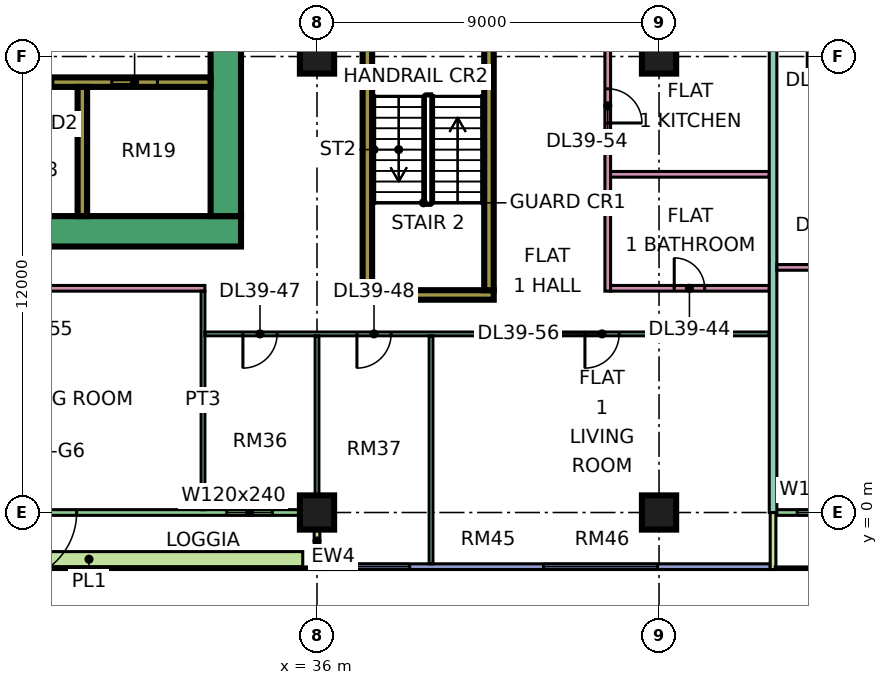
"""IFC4 building model, lengths in metres.
Left out: names, types, materials, properties, quantities, classifications, styles, units other than length and angle.
Written with IfcOpenShell. Run it as: python <this file> out.ifc"""

import sys

from ifc_helpers import new_model, si_unit, direction, frame, frame_2d, origin, origin_2d, place, context, subcontext, project, spatial, rectangle, extrude, element, fill, save


model = new_model("IFC4")
c1 = context("Model", 3, precision=1e-05, world=origin(), true_north=direction((0.0, 1.0)))
c2 = subcontext(c1, "Body", "Model", "MODEL_VIEW")
j1 = project(units=[si_unit("LENGTHUNIT", "METRE"), si_unit("PLANEANGLEUNIT", "RADIAN")], contexts=[c1])
p1 = place(None, origin())
s1 = spatial("IfcSite", under=j1, at=p1, CompositionType="ELEMENT")
p2 = place(p1, origin())
s2 = spatial("IfcBuilding", under=s1, at=p2, CompositionType="ELEMENT")
p3 = place(p2, frame((0.0, 0.0, 172.4)))
s3 = spatial("IfcBuildingStorey", under=s2, at=p3, CompositionType="ELEMENT", Elevation=172.4)
for number, where, z_axis, x_axis in (
    (1, (36.0, 0.0, 0.0), (0.0, 0.0, 1.0), (1.0, 0.0, 0.0)),
    (2, (36.0, 12.0, 0.0), (0.0, 0.0, 1.0), (1.0, 0.0, 0.0)),
    (3, (45.0, 0.0, 0.0), (0.0, 0.0, 1.0), (1.0, 0.0, 0.0)),
    (4, (45.0, 12.0, 0.0), (0.0, 0.0, 1.0), (1.0, 0.0, 0.0)),
):
    element("IfcColumn", number, at=place(p3, frame(where, z_axis=z_axis, x_axis=x_axis)), inside=s3, PredefinedType="COLUMN", context=c2, shape_type="SweptSolid", body=[
        extrude(rectangle(XDim=0.9, YDim=0.9, at=origin_2d()), origin(), (0.0, 0.0, 1.0), 3.75),
    ])
p4 = place(p3, frame((9.0, 7.4, 0.0), z_axis=(0.0, 0.0, 1.0), x_axis=(1.0, 0.0, 0.0)))
e5 = element("IfcWall", 5, at=p4, inside=s3, PredefinedType="SHEAR", context=c2, shape_type="SweptSolid", body=[
    extrude(rectangle(XDim=25.0, YDim=0.8, at=frame_2d((12.5, 0.0))), origin(), (0.0, 0.0, 1.0), 3.75),
])
p5 = place(p3, frame((33.6, 7.8, 0.0), z_axis=(0.0, 0.0, 1.0), x_axis=(0.0, 1.0, 0.0)))
e6 = element("IfcWall", 6, at=p5, inside=s3, PredefinedType="SHEAR", context=c2, shape_type="SweptSolid", body=[
    extrude(rectangle(XDim=11.4, YDim=0.8, at=frame_2d((5.7, 0.0))), origin(), (0.0, 0.0, 1.0), 3.75),
])
p6 = place(p5, frame((5.4, 0.0, 0.0)))
e7 = element("IfcOpeningElement", 7, at=p6, cuts=e6, PredefinedType="OPENING", context=c2, shape_type="SweptSolid", body=[
    extrude(rectangle(XDim=1.8, YDim=2.4, at=frame_2d((0.9, 1.2))), frame((0.0, 0.41, 0.0), z_axis=(0.0, -1.0, 0.0), x_axis=(1.0, 0.0, 0.0)), (0.0, 0.0, 1.0), 0.82),
])
p7 = place(p3, frame((13.45, 11.325, 0.0), z_axis=(0.0, 0.0, 1.0), x_axis=(1.0, 0.0, 0.0)))
e8 = element("IfcWall", 8, at=p7, inside=s3, PredefinedType="SHEAR", context=c2, shape_type="SweptSolid", body=[
    extrude(rectangle(XDim=19.75, YDim=0.25, at=frame_2d((9.875, 0.0))), origin(), (0.0, 0.0, 1.0), 3.75),
])
p8 = place(p7, frame((11.65, 0.0, 0.0)))
e9 = element("IfcOpeningElement", 9, at=p8, cuts=e8, PredefinedType="OPENING", context=c2, shape_type="SweptSolid", body=[
    extrude(rectangle(XDim=1.2, YDim=2.2, at=frame_2d((0.6, 1.1))), frame((0.0, 0.135, 0.0), z_axis=(0.0, -1.0, 0.0), x_axis=(1.0, 0.0, 0.0)), (0.0, 0.0, 1.0), 0.27),
])
p9 = place(p7, frame((14.4, 0.0, 0.0)))
e10 = element("IfcOpeningElement", 10, at=p9, cuts=e8, PredefinedType="OPENING", context=c2, shape_type="SweptSolid", body=[
    extrude(rectangle(XDim=1.2, YDim=2.2, at=frame_2d((0.6, 1.1))), frame((0.0, 0.135, 0.0), z_axis=(0.0, -1.0, 0.0), x_axis=(1.0, 0.0, 0.0)), (0.0, 0.0, 1.0), 0.27),
])
p10 = place(p7, frame((17.15, 0.0, 0.0)))
e11 = element("IfcOpeningElement", 11, at=p10, cuts=e8, PredefinedType="OPENING", context=c2, shape_type="SweptSolid", body=[
    extrude(rectangle(XDim=1.2, YDim=2.2, at=frame_2d((0.6, 1.1))), frame((0.0, 0.135, 0.0), z_axis=(0.0, -1.0, 0.0), x_axis=(1.0, 0.0, 0.0)), (0.0, 0.0, 1.0), 0.27),
])
p11 = place(p7, frame((2.8, 0.0, 0.0)))
e12 = element("IfcOpeningElement", 12, at=p11, cuts=e8, PredefinedType="OPENING", context=c2, shape_type="SweptSolid", body=[
    extrude(rectangle(XDim=0.9, YDim=2.1, at=frame_2d((0.45, 1.05))), frame((0.0, 0.135, 0.0), z_axis=(0.0, -1.0, 0.0), x_axis=(1.0, 0.0, 0.0)), (0.0, 0.0, 1.0), 0.27),
])
p12 = place(p7, frame((8.175, 0.0, 0.0)))
e13 = element("IfcOpeningElement", 13, at=p12, cuts=e8, PredefinedType="OPENING", context=c2, shape_type="SweptSolid", body=[
    extrude(rectangle(XDim=0.9, YDim=2.1, at=frame_2d((0.45, 1.05))), frame((0.0, 0.135, 0.0), z_axis=(0.0, -1.0, 0.0), x_axis=(1.0, 0.0, 0.0)), (0.0, 0.0, 1.0), 0.27),
])
p13 = place(p3, frame((29.825, 7.8, 0.0), z_axis=(0.0, 0.0, 1.0), x_axis=(0.0, 1.0, 0.0)))
e14 = element("IfcWall", 14, at=p13, inside=s3, PredefinedType="SHEAR", context=c2, shape_type="SweptSolid", body=[
    extrude(rectangle(XDim=3.4, YDim=0.25, at=frame_2d((1.7, 0.0))), origin(), (0.0, 0.0, 1.0), 3.75),
])
p14 = place(p3, frame((37.2, 5.725, 0.0), z_axis=(0.0, 0.0, 1.0), x_axis=(1.0, 0.0, 0.0)))
e15 = element("IfcWall", 15, at=p14, inside=s3, PredefinedType="SHEAR", context=c2, shape_type="SweptSolid", body=[
    extrude(rectangle(XDim=3.45, YDim=0.25, at=frame_2d((1.725, 0.0))), origin(), (0.0, 0.0, 1.0), 3.75),
])
for number, where, z_axis, x_axis in (
    (16, (37.325, 5.85, 0.0), (0.0, 0.0, 1.0), (0.0, 1.0, 0.0)),
    (17, (40.525, 5.85, 0.0), (0.0, 0.0, 1.0), (0.0, 1.0, 0.0)),
):
    element("IfcWall", number, at=place(p3, frame(where, z_axis=z_axis, x_axis=x_axis)), inside=s3, PredefinedType="SHEAR", context=c2, shape_type="SweptSolid", body=[
        extrude(rectangle(XDim=6.5, YDim=0.25, at=frame_2d((3.25, 0.0))), origin(), (0.0, 0.0, 1.0), 3.75),
    ])
p15 = place(p3, frame((24.075, 0.0, 0.0), z_axis=(0.0, 0.0, 1.0), x_axis=(1.0, 0.0, 0.0)))
e18 = element("IfcWall", 18, at=p15, inside=s3, PredefinedType="SOLIDWALL", context=c2, shape_type="SweptSolid", body=[
    extrude(rectangle(XDim=11.85, YDim=0.15, at=frame_2d((5.925, 0.0))), origin(), (0.0, 0.0, 1.0), 3.35),
])
p16 = place(p15, frame((3.8, 0.0, 0.0)))
e19 = element("IfcOpeningElement", 19, at=p16, cuts=e18, PredefinedType="OPENING", context=c2, shape_type="SweptSolid", body=[
    extrude(rectangle(XDim=1.8, YDim=2.4, at=frame_2d((0.9, 1.2))), frame((0.0, 0.085, 0.0), z_axis=(0.0, -1.0, 0.0), x_axis=(1.0, 0.0, 0.0)), (0.0, 0.0, 1.0), 0.17),
])
p17 = place(p15, frame((9.55, 0.0, 0.45)))
e20 = element("IfcOpeningElement", 20, at=p17, cuts=e18, PredefinedType="OPENING", context=c2, shape_type="SweptSolid", body=[
    extrude(rectangle(XDim=1.2, YDim=2.4, at=frame_2d((0.6, 1.2))), frame((0.0, 0.085, 0.0), z_axis=(0.0, -1.0, 0.0), x_axis=(1.0, 0.0, 0.0)), (0.0, 0.0, 1.0), 0.17),
])
p18 = place(p3, frame((36.0, -1.5, 0.0), z_axis=(0.0, 0.0, 1.0), x_axis=(0.0, 1.0, 0.0)))
e21 = element("IfcWall", 21, at=p18, inside=s3, PredefinedType="SOLIDWALL", context=c2, shape_type="SweptSolid", body=[
    extrude(rectangle(XDim=1.5, YDim=0.15, at=frame_2d((0.75, 0.0))), origin(), (0.0, 0.0, 1.0), 3.35),
])
p19 = place(p3, frame((36.075, -1.425, 0.0), z_axis=(0.0, 0.0, 1.0), x_axis=(1.0, 0.0, 0.0)))
e22 = element("IfcWall", 22, at=p19, inside=s3, PredefinedType="SOLIDWALL", context=c2, shape_type="SweptSolid", body=[
    extrude(rectangle(XDim=11.85, YDim=0.15, at=frame_2d((5.925, 0.0))), origin(), (0.0, 0.0, 1.0), 3.35),
])
p20 = place(p19, frame((0.562, 0.0, 0.45)))
e23 = element("IfcOpeningElement", 23, at=p20, cuts=e22, PredefinedType="OPENING", context=c2, shape_type="SweptSolid", body=[
    extrude(rectangle(XDim=1.8, YDim=2.4, at=frame_2d((0.9, 1.2))), frame((0.0, 0.085, 0.0), z_axis=(0.0, -1.0, 0.0), x_axis=(1.0, 0.0, 0.0)), (0.0, 0.0, 1.0), 0.17),
])
p21 = place(p19, frame((5.887, 0.0, 0.45)))
e24 = element("IfcOpeningElement", 24, at=p21, cuts=e22, PredefinedType="OPENING", context=c2, shape_type="SweptSolid", body=[
    extrude(rectangle(XDim=3.0, YDim=2.4, at=frame_2d((1.5, 1.2))), frame((0.0, 0.085, 0.0), z_axis=(0.0, -1.0, 0.0), x_axis=(1.0, 0.0, 0.0)), (0.0, 0.0, 1.0), 0.17),
])
p22 = place(p3, frame((48.075, 0.0, 0.0), z_axis=(0.0, 0.0, 1.0), x_axis=(1.0, 0.0, 0.0)))
e25 = element("IfcWall", 25, at=p22, inside=s3, PredefinedType="SOLIDWALL", context=c2, shape_type="SweptSolid", body=[
    extrude(rectangle(XDim=13.35, YDim=0.15, at=frame_2d((6.675, 0.0))), origin(), (0.0, 0.0, 1.0), 3.35),
])
p23 = place(p22, frame((0.562, 0.0, 0.45)))
e26 = element("IfcOpeningElement", 26, at=p23, cuts=e25, PredefinedType="OPENING", context=c2, shape_type="SweptSolid", body=[
    extrude(rectangle(XDim=1.8, YDim=2.4, at=frame_2d((0.9, 1.2))), frame((0.0, 0.085, 0.0), z_axis=(0.0, -1.0, 0.0), x_axis=(1.0, 0.0, 0.0)), (0.0, 0.0, 1.0), 0.17),
])
p24 = place(p22, frame((3.55, 0.0, 0.0)))
e27 = element("IfcOpeningElement", 27, at=p24, cuts=e25, PredefinedType="OPENING", context=c2, shape_type="SweptSolid", body=[
    extrude(rectangle(XDim=1.2, YDim=2.4, at=frame_2d((0.6, 1.2))), frame((0.0, 0.085, 0.0), z_axis=(0.0, -1.0, 0.0), x_axis=(1.0, 0.0, 0.0)), (0.0, 0.0, 1.0), 0.17),
])
p25 = place(p22, frame((7.1, 0.0, 0.45)))
e28 = element("IfcOpeningElement", 28, at=p25, cuts=e25, PredefinedType="OPENING", context=c2, shape_type="SweptSolid", body=[
    extrude(rectangle(XDim=1.2, YDim=2.4, at=frame_2d((0.6, 1.2))), frame((0.0, 0.085, 0.0), z_axis=(0.0, -1.0, 0.0), x_axis=(1.0, 0.0, 0.0)), (0.0, 0.0, 1.0), 0.17),
])
p26 = place(p22, frame((9.637, 0.0, 0.45)))
e29 = element("IfcOpeningElement", 29, at=p26, cuts=e25, PredefinedType="OPENING", context=c2, shape_type="SweptSolid", body=[
    extrude(rectangle(XDim=3.0, YDim=2.4, at=frame_2d((1.5, 1.2))), frame((0.0, 0.085, 0.0), z_axis=(0.0, -1.0, 0.0), x_axis=(1.0, 0.0, 0.0)), (0.0, 0.0, 1.0), 0.17),
])
p27 = place(p3, frame((48.0, -1.5, 0.0), z_axis=(0.0, 0.0, 1.0), x_axis=(0.0, 1.0, 0.0)))
e30 = element("IfcWall", 30, at=p27, inside=s3, PredefinedType="SOLIDWALL", context=c2, shape_type="SweptSolid", body=[
    extrude(rectangle(XDim=1.5, YDim=0.15, at=frame_2d((0.75, 0.0))), origin(), (0.0, 0.0, 1.0), 3.35),
])
p28 = place(p3, frame((24.375, -1.229, 0.0), z_axis=(0.0, 0.0, 1.0), x_axis=(1.0, 0.0, 0.0)))
e31 = element("IfcWall", 31, at=p28, inside=s3, PredefinedType="SOLIDWALL", context=c2, shape_type="SweptSolid", body=[
    extrude(rectangle(XDim=11.25, YDim=0.4, at=frame_2d((5.625, 0.0))), origin(), (0.0, 0.0, 1.0), 0.7),
])
p29 = place(p3, frame((11.95, 5.9, 0.0), z_axis=(0.0, 0.0, 1.0), x_axis=(1.0, 0.0, 0.0)))
e32 = element("IfcWall", 32, at=p29, inside=s3, PredefinedType="PARTITIONING", context=c2, shape_type="SweptSolid", body=[
    extrude(rectangle(XDim=21.1, YDim=0.15, at=frame_2d((10.55, 0.0))), origin(), (0.0, 0.0, 1.0), 3.35),
])
p30 = place(p29, frame((1.1, 0.0, 0.0)))
e33 = element("IfcOpeningElement", 33, at=p30, cuts=e32, PredefinedType="OPENING", context=c2, shape_type="SweptSolid", body=[
    extrude(rectangle(XDim=0.9, YDim=2.1, at=frame_2d((0.45, 1.05))), frame((0.0, 0.085, 0.0), z_axis=(0.0, -1.0, 0.0), x_axis=(1.0, 0.0, 0.0)), (0.0, 0.0, 1.0), 0.17),
])
p31 = place(p29, frame((4.1, 0.0, 0.0)))
e34 = element("IfcOpeningElement", 34, at=p31, cuts=e32, PredefinedType="OPENING", context=c2, shape_type="SweptSolid", body=[
    extrude(rectangle(XDim=0.9, YDim=2.1, at=frame_2d((0.45, 1.05))), frame((0.0, 0.085, 0.0), z_axis=(0.0, -1.0, 0.0), x_axis=(1.0, 0.0, 0.0)), (0.0, 0.0, 1.0), 0.17),
])
p32 = place(p29, frame((10.1, 0.0, 0.0)))
e35 = element("IfcOpeningElement", 35, at=p32, cuts=e32, PredefinedType="OPENING", context=c2, shape_type="SweptSolid", body=[
    extrude(rectangle(XDim=0.9, YDim=2.1, at=frame_2d((0.45, 1.05))), frame((0.0, 0.085, 0.0), z_axis=(0.0, -1.0, 0.0), x_axis=(1.0, 0.0, 0.0)), (0.0, 0.0, 1.0), 0.17),
])
p33 = place(p29, frame((16.1, 0.0, 0.0)))
e36 = element("IfcOpeningElement", 36, at=p33, cuts=e32, PredefinedType="OPENING", context=c2, shape_type="SweptSolid", body=[
    extrude(rectangle(XDim=0.9, YDim=2.1, at=frame_2d((0.45, 1.05))), frame((0.0, 0.085, 0.0), z_axis=(0.0, -1.0, 0.0), x_axis=(1.0, 0.0, 0.0)), (0.0, 0.0, 1.0), 0.17),
])
p34 = place(p3, frame((33.0, 0.074, 0.0), z_axis=(0.0, 0.0, 1.0), x_axis=(0.0, 1.0, 0.0)))
e37 = element("IfcWall", 37, at=p34, inside=s3, PredefinedType="PARTITIONING", context=c2, shape_type="SweptSolid", body=[
    extrude(rectangle(XDim=5.751, YDim=0.1, at=frame_2d((2.875, 0.0))), origin(), (0.0, 0.0, 1.0), 3.35),
])
p35 = place(p3, frame((33.05, 4.7, 0.0), z_axis=(0.0, 0.0, 1.0), x_axis=(1.0, 0.0, 0.0)))
e38 = element("IfcWall", 38, at=p35, inside=s3, PredefinedType="PARTITIONING", context=c2, shape_type="SweptSolid", body=[
    extrude(rectangle(XDim=14.85, YDim=0.1, at=frame_2d((7.425, 0.0))), origin(), (0.0, 0.0, 1.0), 3.35),
])
p36 = place(p35, frame((1.0, 0.0, 0.0)))
e39 = element("IfcOpeningElement", 39, at=p36, cuts=e38, PredefinedType="OPENING", context=c2, shape_type="SweptSolid", body=[
    extrude(rectangle(XDim=0.9, YDim=2.1, at=frame_2d((0.45, 1.05))), frame((0.0, 0.06, 0.0), z_axis=(0.0, -1.0, 0.0), x_axis=(1.0, 0.0, 0.0)), (0.0, 0.0, 1.0), 0.12),
])
p37 = place(p35, frame((4.0, 0.0, 0.0)))
e40 = element("IfcOpeningElement", 40, at=p37, cuts=e38, PredefinedType="OPENING", context=c2, shape_type="SweptSolid", body=[
    extrude(rectangle(XDim=0.9, YDim=2.1, at=frame_2d((0.45, 1.05))), frame((0.0, 0.06, 0.0), z_axis=(0.0, -1.0, 0.0), x_axis=(1.0, 0.0, 0.0)), (0.0, 0.0, 1.0), 0.12),
])
p38 = place(p35, frame((10.0, 0.0, 0.0)))
e41 = element("IfcOpeningElement", 41, at=p38, cuts=e38, PredefinedType="OPENING", context=c2, shape_type="SweptSolid", body=[
    extrude(rectangle(XDim=0.9, YDim=2.1, at=frame_2d((0.45, 1.05))), frame((0.0, 0.06, 0.0), z_axis=(0.0, -1.0, 0.0), x_axis=(1.0, 0.0, 0.0)), (0.0, 0.0, 1.0), 0.12),
])
p39 = place(p3, frame((36.0, 0.0, 0.0), z_axis=(0.0, 0.0, 1.0), x_axis=(0.0, 1.0, 0.0)))
e42 = element("IfcWall", 42, at=p39, inside=s3, PredefinedType="PARTITIONING", context=c2, shape_type="SweptSolid", body=[
    extrude(rectangle(XDim=4.65, YDim=0.1, at=frame_2d((2.325, 0.0))), origin(), (0.0, 0.0, 1.0), 3.35),
])
p40 = place(p3, frame((39.0, -1.35, 0.0), z_axis=(0.0, 0.0, 1.0), x_axis=(0.0, 1.0, 0.0)))
e43 = element("IfcWall", 43, at=p40, inside=s3, PredefinedType="PARTITIONING", context=c2, shape_type="SweptSolid", body=[
    extrude(rectangle(XDim=6.0, YDim=0.1, at=frame_2d((3.0, 0.0))), origin(), (0.0, 0.0, 1.0), 3.35),
])
p41 = place(p3, frame((43.65, 5.825, 0.0), z_axis=(0.0, 0.0, 1.0), x_axis=(0.0, 1.0, 0.0)))
e44 = element("IfcWall", 44, at=p41, inside=s3, PredefinedType="PARTITIONING", context=c2, shape_type="SweptSolid", body=[
    extrude(rectangle(XDim=6.525, YDim=0.15, at=frame_2d((3.263, 0.0))), origin(), (0.0, 0.0, 1.0), 3.35),
])
p42 = place(p41, frame((4.425, 0.0, 0.0)))
e45 = element("IfcOpeningElement", 45, at=p42, cuts=e44, PredefinedType="OPENING", context=c2, shape_type="SweptSolid", body=[
    extrude(rectangle(XDim=0.9, YDim=2.1, at=frame_2d((0.45, 1.05))), frame((0.0, 0.085, 0.0), z_axis=(0.0, -1.0, 0.0), x_axis=(1.0, 0.0, 0.0)), (0.0, 0.0, 1.0), 0.17),
])
p43 = place(p3, frame((43.725, 5.9, 0.0), z_axis=(0.0, 0.0, 1.0), x_axis=(1.0, 0.0, 0.0)))
e46 = element("IfcWall", 46, at=p43, inside=s3, PredefinedType="PARTITIONING", context=c2, shape_type="SweptSolid", body=[
    extrude(rectangle(XDim=4.175, YDim=0.15, at=frame_2d((2.087, 0.0))), origin(), (0.0, 0.0, 1.0), 3.35),
])
p44 = place(p43, frame((1.675, 0.0, 0.0)))
e47 = element("IfcOpeningElement", 47, at=p44, cuts=e46, PredefinedType="OPENING", context=c2, shape_type="SweptSolid", body=[
    extrude(rectangle(XDim=0.8, YDim=2.1, at=frame_2d((0.4, 1.05))), frame((0.0, 0.085, 0.0), z_axis=(0.0, -1.0, 0.0), x_axis=(1.0, 0.0, 0.0)), (0.0, 0.0, 1.0), 0.17),
])
p45 = place(p3, frame((43.725, 8.9, 0.0), z_axis=(0.0, 0.0, 1.0), x_axis=(1.0, 0.0, 0.0)))
e48 = element("IfcWall", 48, at=p45, inside=s3, PredefinedType="PARTITIONING", context=c2, shape_type="SweptSolid", body=[
    extrude(rectangle(XDim=4.175, YDim=0.15, at=frame_2d((2.087, 0.0))), origin(), (0.0, 0.0, 1.0), 3.35),
])
p46 = place(p3, frame((48.0, 0.0, 0.0), z_axis=(0.0, 0.0, 1.0), x_axis=(0.0, 1.0, 0.0)))
e49 = element("IfcWall", 49, at=p46, inside=s3, PredefinedType="PARTITIONING", context=c2, shape_type="SweptSolid", body=[
    extrude(rectangle(XDim=12.35, YDim=0.2, at=frame_2d((6.175, 0.0))), origin(), (0.0, 0.0, 1.0), 3.35),
])
p47 = place(p3, frame((48.1, 6.45, 0.0), z_axis=(0.0, 0.0, 1.0), x_axis=(1.0, 0.0, 0.0)))
e50 = element("IfcWall", 50, at=p47, inside=s3, PredefinedType="PARTITIONING", context=c2, shape_type="SweptSolid", body=[
    extrude(rectangle(XDim=8.95, YDim=0.15, at=frame_2d((4.475, 0.0))), origin(), (0.0, 0.0, 1.0), 3.35),
])
p48 = place(p47, frame((0.95, 0.0, 0.0)))
e51 = element("IfcOpeningElement", 51, at=p48, cuts=e50, PredefinedType="OPENING", context=c2, shape_type="SweptSolid", body=[
    extrude(rectangle(XDim=0.9, YDim=2.1, at=frame_2d((0.45, 1.05))), frame((0.0, 0.085, 0.0), z_axis=(0.0, -1.0, 0.0), x_axis=(1.0, 0.0, 0.0)), (0.0, 0.0, 1.0), 0.17),
])
p49 = place(p47, frame((6.95, 0.0, 0.0)))
e52 = element("IfcOpeningElement", 52, at=p49, cuts=e50, PredefinedType="OPENING", context=c2, shape_type="SweptSolid", body=[
    extrude(rectangle(XDim=0.9, YDim=2.1, at=frame_2d((0.45, 1.05))), frame((0.0, 0.085, 0.0), z_axis=(0.0, -1.0, 0.0), x_axis=(1.0, 0.0, 0.0)), (0.0, 0.0, 1.0), 0.17),
])
p50 = place(p16, frame((1.8, 0.0, 0.0), z_axis=(0.0, 0.0, 1.0), x_axis=(-1.0, 0.0, 0.0)))
e53 = element("IfcDoor", 53, at=p50, inside=s3, OperationType="DOUBLE_DOOR_SINGLE_SWING", PredefinedType="DOOR", context=c2, shape_type="SweptSolid", body=[
    extrude(rectangle(XDim=1.8, YDim=2.4, at=frame_2d((0.9, 1.2))), frame((0.0, 0.025, 0.0), z_axis=(0.0, -1.0, 0.0), x_axis=(1.0, 0.0, 0.0)), (0.0, 0.0, 1.0), 0.05),
])
fill(e19, e53)
p51 = place(p17, origin())
e54 = element("IfcWindow", 54, at=p51, inside=s3, PartitioningType="SINGLE_PANEL", PredefinedType="WINDOW", context=c2, shape_type="SweptSolid", body=[
    extrude(rectangle(XDim=1.2, YDim=2.4, at=frame_2d((0.6, 1.2))), frame((0.0, 0.03, 0.0), z_axis=(0.0, -1.0, 0.0), x_axis=(1.0, 0.0, 0.0)), (0.0, 0.0, 1.0), 0.06),
])
fill(e20, e54)
p52 = place(p20, origin())
e55 = element("IfcWindow", 55, at=p52, inside=s3, PartitioningType="SINGLE_PANEL", PredefinedType="WINDOW", context=c2, shape_type="SweptSolid", body=[
    extrude(rectangle(XDim=1.8, YDim=2.4, at=frame_2d((0.9, 1.2))), frame((0.0, 0.03, 0.0), z_axis=(0.0, -1.0, 0.0), x_axis=(1.0, 0.0, 0.0)), (0.0, 0.0, 1.0), 0.06),
])
fill(e23, e55)
p53 = place(p21, origin())
e56 = element("IfcWindow", 56, at=p53, inside=s3, PartitioningType="SINGLE_PANEL", PredefinedType="WINDOW", context=c2, shape_type="SweptSolid", body=[
    extrude(rectangle(XDim=3.0, YDim=2.4, at=frame_2d((1.5, 1.2))), frame((0.0, 0.03, 0.0), z_axis=(0.0, -1.0, 0.0), x_axis=(1.0, 0.0, 0.0)), (0.0, 0.0, 1.0), 0.06),
])
fill(e24, e56)
p54 = place(p23, origin())
e57 = element("IfcWindow", 57, at=p54, inside=s3, PartitioningType="SINGLE_PANEL", PredefinedType="WINDOW", context=c2, shape_type="SweptSolid", body=[
    extrude(rectangle(XDim=1.8, YDim=2.4, at=frame_2d((0.9, 1.2))), frame((0.0, 0.03, 0.0), z_axis=(0.0, -1.0, 0.0), x_axis=(1.0, 0.0, 0.0)), (0.0, 0.0, 1.0), 0.06),
])
fill(e26, e57)
p55 = place(p9, origin())
e58 = element("IfcDoor", 58, at=p55, inside=s3, OperationType="DOUBLE_DOOR_SLIDING", PredefinedType="DOOR", context=c2, shape_type="SweptSolid", body=[
    extrude(rectangle(XDim=1.2, YDim=2.2, at=frame_2d((0.6, 1.1))), frame((0.0, 0.025, 0.0), z_axis=(0.0, -1.0, 0.0), x_axis=(1.0, 0.0, 0.0)), (0.0, 0.0, 1.0), 0.05),
])
fill(e10, e58)
p56 = place(p10, origin())
e59 = element("IfcDoor", 59, at=p56, inside=s3, OperationType="DOUBLE_DOOR_SLIDING", PredefinedType="DOOR", context=c2, shape_type="SweptSolid", body=[
    extrude(rectangle(XDim=1.2, YDim=2.2, at=frame_2d((0.6, 1.1))), frame((0.0, 0.025, 0.0), z_axis=(0.0, -1.0, 0.0), x_axis=(1.0, 0.0, 0.0)), (0.0, 0.0, 1.0), 0.05),
])
fill(e11, e59)
p57 = place(p44, origin())
e60 = element("IfcDoor", 60, at=p57, inside=s3, OperationType="SINGLE_SWING_LEFT", PredefinedType="DOOR", context=c2, shape_type="SweptSolid", body=[
    extrude(rectangle(XDim=0.8, YDim=2.1, at=frame_2d((0.4, 1.05))), frame((0.0, 0.025, 0.0), z_axis=(0.0, -1.0, 0.0), x_axis=(1.0, 0.0, 0.0)), (0.0, 0.0, 1.0), 0.05),
])
fill(e47, e60)
p58 = place(p36, frame((0.9, 0.0, 0.0), z_axis=(0.0, 0.0, 1.0), x_axis=(-1.0, 0.0, 0.0)))
e61 = element("IfcDoor", 61, at=p58, inside=s3, OperationType="SINGLE_SWING_LEFT", PredefinedType="DOOR", context=c2, shape_type="SweptSolid", body=[
    extrude(rectangle(XDim=0.9, YDim=2.1, at=frame_2d((0.45, 1.05))), frame((0.0, 0.025, 0.0), z_axis=(0.0, -1.0, 0.0), x_axis=(1.0, 0.0, 0.0)), (0.0, 0.0, 1.0), 0.05),
])
fill(e39, e61)
p59 = place(p37, frame((0.9, 0.0, 0.0), z_axis=(0.0, 0.0, 1.0), x_axis=(-1.0, 0.0, 0.0)))
e62 = element("IfcDoor", 62, at=p59, inside=s3, OperationType="SINGLE_SWING_LEFT", PredefinedType="DOOR", context=c2, shape_type="SweptSolid", body=[
    extrude(rectangle(XDim=0.9, YDim=2.1, at=frame_2d((0.45, 1.05))), frame((0.0, 0.025, 0.0), z_axis=(0.0, -1.0, 0.0), x_axis=(1.0, 0.0, 0.0)), (0.0, 0.0, 1.0), 0.05),
])
fill(e40, e62)
p60 = place(p42, frame((0.9, 0.0, 0.0), z_axis=(0.0, 0.0, 1.0), x_axis=(-1.0, 0.0, 0.0)))
e63 = element("IfcDoor", 63, at=p60, inside=s3, OperationType="SINGLE_SWING_LEFT", PredefinedType="DOOR", context=c2, shape_type="SweptSolid", body=[
    extrude(rectangle(XDim=0.9, YDim=2.1, at=frame_2d((0.45, 1.05))), frame((0.0, 0.025, 0.0), z_axis=(0.0, -1.0, 0.0), x_axis=(1.0, 0.0, 0.0)), (0.0, 0.0, 1.0), 0.05),
])
fill(e45, e63)
p61 = place(p38, frame((0.9, 0.0, 0.0), z_axis=(0.0, 0.0, 1.0), x_axis=(-1.0, 0.0, 0.0)))
e64 = element("IfcDoor", 64, at=p61, inside=s3, OperationType="SINGLE_SWING_LEFT", PredefinedType="DOOR", context=c2, shape_type="SweptSolid", body=[
    extrude(rectangle(XDim=0.9, YDim=2.1, at=frame_2d((0.45, 1.05))), frame((0.0, 0.025, 0.0), z_axis=(0.0, -1.0, 0.0), x_axis=(1.0, 0.0, 0.0)), (0.0, 0.0, 1.0), 0.05),
])
fill(e41, e64)
save(model, sys.argv[1])
